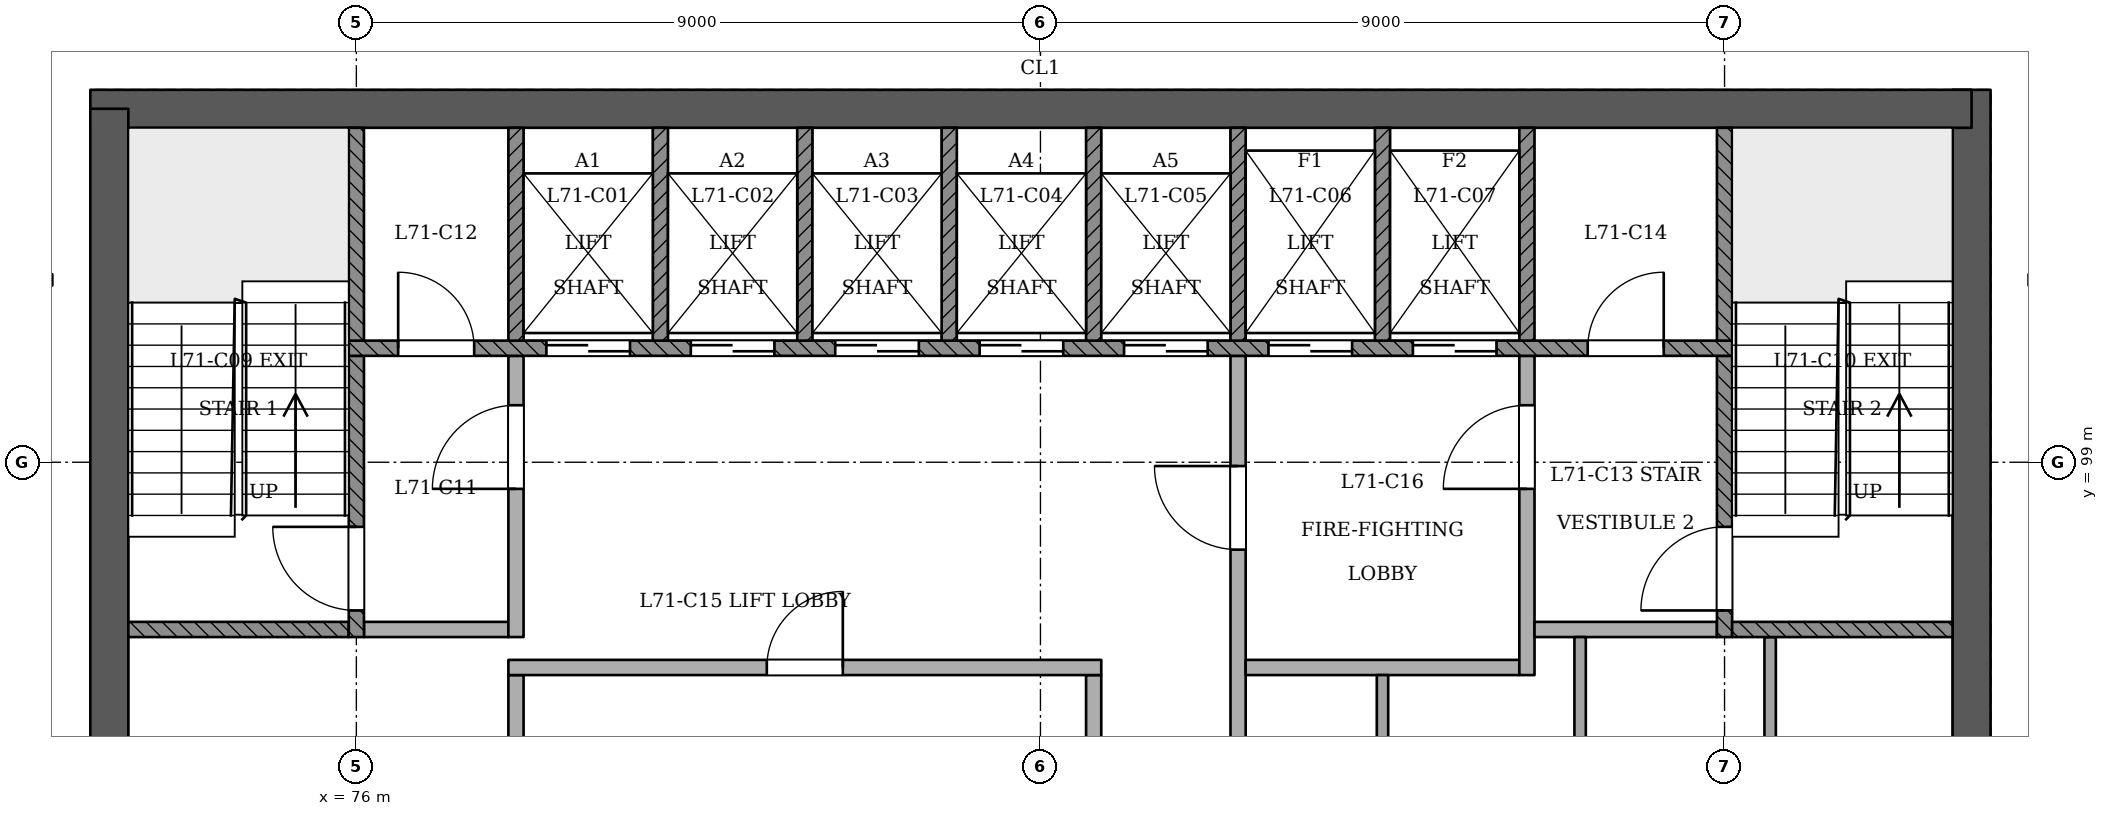
"""IFC4 building model, lengths in metres.
Left out: names, types, materials, properties, quantities, classifications, styles, units other than length and angle.
Written with IfcOpenShell. Run it as: python <this file> out.ifc"""

import sys

from ifc_helpers import new_model, si_unit, direction, frame, frame_2d, origin, place, context, subcontext, project, spatial, rectangle, extrude, element, fill, save


model = new_model("IFC4")
c1 = context("Model", 3, precision=1e-05, world=origin(), true_north=direction((0.0, 1.0)))
c2 = subcontext(c1, "Body", "Model", "MODEL_VIEW")
j1 = project(units=[si_unit("LENGTHUNIT", "METRE"), si_unit("PLANEANGLEUNIT", "RADIAN")], contexts=[c1])
p1 = place(None, origin())
s1 = spatial("IfcSite", under=j1, at=p1, CompositionType="ELEMENT")
p2 = place(p1, origin())
s2 = spatial("IfcBuilding", under=s1, at=p2, CompositionType="ELEMENT")
p3 = place(p2, frame((0.0, 0.0, 275.2)))
s3 = spatial("IfcBuildingStorey", under=s2, at=p3, CompositionType="ELEMENT", Elevation=275.2)
p4 = place(p3, frame((97.25, 93.15, 0.0), z_axis=(0.0, 0.0, 1.0), x_axis=(0.0, 1.0, 0.0)))
e1 = element("IfcWall", 1, at=p4, inside=s3, PredefinedType="SHEAR", context=c2, shape_type="SweptSolid", body=[
    extrude(rectangle(XDim=10.75, YDim=0.5, at=frame_2d((5.375, 0.0))), origin(), (0.0, 0.0, 1.0), 3.6),
])
p5 = place(p3, frame((97.25, 103.65, 0.0), z_axis=(0.0, 0.0, 1.0), x_axis=(-1.0, 0.0, 0.0)))
e2 = element("IfcWall", 2, at=p5, inside=s3, PredefinedType="SHEAR", context=c2, shape_type="SweptSolid", body=[
    extrude(rectangle(XDim=24.75, YDim=0.5, at=frame_2d((12.375, 0.0))), origin(), (0.0, 0.0, 1.0), 3.6),
])
p6 = place(p3, frame((72.75, 103.65, 0.0), z_axis=(0.0, 0.0, 1.0), x_axis=(0.0, -1.0, 0.0)))
e3 = element("IfcWall", 3, at=p6, inside=s3, PredefinedType="SHEAR", context=c2, shape_type="SweptSolid", body=[
    extrude(rectangle(XDim=10.75, YDim=0.5, at=frame_2d((5.375, 0.0))), origin(), (0.0, 0.0, 1.0), 3.6),
])
p7 = place(p3, frame((72.0, 101.4, 0.0), z_axis=(0.0, 0.0, 1.0), x_axis=(-1.0, 0.0, 0.0)))
e4 = element("IfcWall", 4, at=p7, inside=s3, PredefinedType="PARTITIONING", context=c2, shape_type="SweptSolid", body=[
    extrude(rectangle(XDim=1.8, YDim=0.15, at=frame_2d((0.9, 0.0))), origin(), (0.0, 0.0, 1.0), 3.2),
])
for number, where, z_axis, x_axis in (
    (5, (78.1, 93.4, 0.0), (0.0, 0.0, 1.0), (0.0, 1.0, 0.0)),
    (6, (85.7, 93.4, 0.0), (0.0, 0.0, 1.0), (0.0, 1.0, 0.0)),
):
    element("IfcWall", number, at=place(p3, frame(where, z_axis=z_axis, x_axis=x_axis)), inside=s3, PredefinedType="PARTITIONING", context=c2, shape_type="SweptSolid", body=[
        extrude(rectangle(XDim=2.8, YDim=0.2, at=frame_2d((1.4, 0.0))), origin(), (0.0, 0.0, 1.0), 3.2),
    ])
p8 = place(p3, frame((87.6, 93.4, 0.0), z_axis=(0.0, 0.0, 1.0), x_axis=(0.0, 1.0, 0.0)))
e7 = element("IfcWall", 7, at=p8, inside=s3, PredefinedType="PARTITIONING", context=c2, shape_type="SweptSolid", body=[
    extrude(rectangle(XDim=7.0, YDim=0.2, at=frame_2d((3.5, 0.0))), origin(), (0.0, 0.0, 1.0), 3.2),
])
p9 = place(p8, frame((4.45, 0.0, 0.0)))
e8 = element("IfcOpeningElement", 8, at=p9, cuts=e7, PredefinedType="OPENING", context=c2, shape_type="SweptSolid", body=[
    extrude(rectangle(XDim=1.1, YDim=2.1, at=frame_2d((0.55, 1.05))), frame((0.0, 0.11, 0.0), z_axis=(0.0, -1.0, 0.0), x_axis=(1.0, 0.0, 0.0)), (0.0, 0.0, 1.0), 0.221),
])
p10 = place(p3, frame((89.5, 93.4, 0.0), z_axis=(0.0, 0.0, 1.0), x_axis=(0.0, 1.0, 0.0)))
e9 = element("IfcWall", 9, at=p10, inside=s3, PredefinedType="PARTITIONING", context=c2, shape_type="SweptSolid", body=[
    extrude(rectangle(XDim=2.8, YDim=0.15, at=frame_2d((1.4, 0.0))), origin(), (0.0, 0.0, 1.0), 3.2),
])
for number, where, z_axis, x_axis in (
    (10, (92.1, 93.4, 0.0), (0.0, 0.0, 1.0), (0.0, 1.0, 0.0)),
    (11, (94.6, 93.4, 0.0), (0.0, 0.0, 1.0), (0.0, 1.0, 0.0)),
):
    element("IfcWall", number, at=place(p3, frame(where, z_axis=z_axis, x_axis=x_axis)), inside=s3, PredefinedType="PARTITIONING", context=c2, shape_type="SweptSolid", body=[
        extrude(rectangle(XDim=3.3, YDim=0.15, at=frame_2d((1.65, 0.0))), origin(), (0.0, 0.0, 1.0), 3.2),
    ])
p11 = place(p3, frame((78.0, 96.3, 0.0), z_axis=(0.0, 0.0, 1.0), x_axis=(1.0, 0.0, 0.0)))
e12 = element("IfcWall", 12, at=p11, inside=s3, PredefinedType="PARTITIONING", context=c2, shape_type="SweptSolid", body=[
    extrude(rectangle(XDim=7.8, YDim=0.2, at=frame_2d((3.9, 0.0))), origin(), (0.0, 0.0, 1.0), 3.2),
])
p12 = place(p11, frame((3.4, 0.0, 0.0)))
e13 = element("IfcOpeningElement", 13, at=p12, cuts=e12, PredefinedType="OPENING", context=c2, shape_type="SweptSolid", body=[
    extrude(rectangle(XDim=1.0, YDim=2.1, at=frame_2d((0.5, 1.05))), frame((0.0, 0.11, 0.0), z_axis=(0.0, -1.0, 0.0), x_axis=(1.0, 0.0, 0.0)), (0.0, 0.0, 1.0), 0.221),
])
p13 = place(p3, frame((87.7, 96.3, 0.0), z_axis=(0.0, 0.0, 1.0), x_axis=(1.0, 0.0, 0.0)))
e14 = element("IfcWall", 14, at=p13, inside=s3, PredefinedType="PARTITIONING", context=c2, shape_type="SweptSolid", body=[
    extrude(rectangle(XDim=3.6, YDim=0.2, at=frame_2d((1.8, 0.0))), origin(), (0.0, 0.0, 1.0), 3.2),
])
p14 = place(p3, frame((91.4, 96.2, 0.0), z_axis=(0.0, 0.0, 1.0), x_axis=(0.0, 1.0, 0.0)))
e15 = element("IfcWall", 15, at=p14, inside=s3, PredefinedType="PARTITIONING", context=c2, shape_type="SweptSolid", body=[
    extrude(rectangle(XDim=4.2, YDim=0.2, at=frame_2d((2.1, 0.0))), origin(), (0.0, 0.0, 1.0), 3.2),
])
p15 = place(p14, frame((2.45, 0.0, 0.0)))
e16 = element("IfcOpeningElement", 16, at=p15, cuts=e15, PredefinedType="OPENING", context=c2, shape_type="SweptSolid", body=[
    extrude(rectangle(XDim=1.1, YDim=2.1, at=frame_2d((0.55, 1.05))), frame((0.0, 0.11, 0.0), z_axis=(0.0, -1.0, 0.0), x_axis=(1.0, 0.0, 0.0)), (0.0, 0.0, 1.0), 0.221),
])
p16 = place(p3, frame((73.0, 96.8, 0.0), z_axis=(0.0, 0.0, 1.0), x_axis=(1.0, 0.0, 0.0)))
e17 = element("IfcWall", 17, at=p16, inside=s3, PredefinedType="SOLIDWALL", context=c2, shape_type="SweptSolid", body=[
    extrude(rectangle(XDim=2.9, YDim=0.2, at=frame_2d((1.45, 0.0))), origin(), (0.0, 0.0, 1.0), 3.2),
])
p17 = place(p3, frame((76.0, 96.7, 0.0), z_axis=(0.0, 0.0, 1.0), x_axis=(0.0, 1.0, 0.0)))
e18 = element("IfcWall", 18, at=p17, inside=s3, PredefinedType="SOLIDWALL", context=c2, shape_type="SweptSolid", body=[
    extrude(rectangle(XDim=3.7, YDim=0.2, at=frame_2d((1.85, 0.0))), origin(), (0.0, 0.0, 1.0), 3.2),
])
p18 = place(p17, frame((0.35, 0.0, 0.0)))
e19 = element("IfcOpeningElement", 19, at=p18, cuts=e18, PredefinedType="OPENING", context=c2, shape_type="SweptSolid", body=[
    extrude(rectangle(XDim=1.1, YDim=2.1, at=frame_2d((0.55, 1.05))), frame((0.0, 0.11, 0.0), z_axis=(0.0, -1.0, 0.0), x_axis=(1.0, 0.0, 0.0)), (0.0, 0.0, 1.0), 0.221),
])
p19 = place(p3, frame((76.1, 96.8, 0.0), z_axis=(0.0, 0.0, 1.0), x_axis=(1.0, 0.0, 0.0)))
e20 = element("IfcWall", 20, at=p19, inside=s3, PredefinedType="PARTITIONING", context=c2, shape_type="SweptSolid", body=[
    extrude(rectangle(XDim=1.9, YDim=0.2, at=frame_2d((0.95, 0.0))), origin(), (0.0, 0.0, 1.0), 3.2),
])
p20 = place(p3, frame((78.1, 96.7, 0.0), z_axis=(0.0, 0.0, 1.0), x_axis=(0.0, 1.0, 0.0)))
e21 = element("IfcWall", 21, at=p20, inside=s3, PredefinedType="PARTITIONING", context=c2, shape_type="SweptSolid", body=[
    extrude(rectangle(XDim=3.7, YDim=0.2, at=frame_2d((1.85, 0.0))), origin(), (0.0, 0.0, 1.0), 3.2),
])
p21 = place(p20, frame((1.95, 0.0, 0.0)))
e22 = element("IfcOpeningElement", 22, at=p21, cuts=e21, PredefinedType="OPENING", context=c2, shape_type="SweptSolid", body=[
    extrude(rectangle(XDim=1.1, YDim=2.1, at=frame_2d((0.55, 1.05))), frame((0.0, 0.11, 0.0), z_axis=(0.0, -1.0, 0.0), x_axis=(1.0, 0.0, 0.0)), (0.0, 0.0, 1.0), 0.221),
])
p22 = place(p3, frame((91.5, 96.8, 0.0), z_axis=(0.0, 0.0, 1.0), x_axis=(1.0, 0.0, 0.0)))
e23 = element("IfcWall", 23, at=p22, inside=s3, PredefinedType="PARTITIONING", context=c2, shape_type="SweptSolid", body=[
    extrude(rectangle(XDim=2.4, YDim=0.2, at=frame_2d((1.2, 0.0))), origin(), (0.0, 0.0, 1.0), 3.2),
])
p23 = place(p3, frame((94.0, 96.7, 0.0), z_axis=(0.0, 0.0, 1.0), x_axis=(0.0, 1.0, 0.0)))
e24 = element("IfcWall", 24, at=p23, inside=s3, PredefinedType="SOLIDWALL", context=c2, shape_type="SweptSolid", body=[
    extrude(rectangle(XDim=3.7, YDim=0.2, at=frame_2d((1.85, 0.0))), origin(), (0.0, 0.0, 1.0), 3.2),
])
p24 = place(p23, frame((0.35, 0.0, 0.0)))
e25 = element("IfcOpeningElement", 25, at=p24, cuts=e24, PredefinedType="OPENING", context=c2, shape_type="SweptSolid", body=[
    extrude(rectangle(XDim=1.1, YDim=2.1, at=frame_2d((0.55, 1.05))), frame((0.0, 0.11, 0.0), z_axis=(0.0, -1.0, 0.0), x_axis=(1.0, 0.0, 0.0)), (0.0, 0.0, 1.0), 0.221),
])
p25 = place(p3, frame((94.1, 96.8, 0.0), z_axis=(0.0, 0.0, 1.0), x_axis=(1.0, 0.0, 0.0)))
e26 = element("IfcWall", 26, at=p25, inside=s3, PredefinedType="SOLIDWALL", context=c2, shape_type="SweptSolid", body=[
    extrude(rectangle(XDim=2.9, YDim=0.2, at=frame_2d((1.45, 0.0))), origin(), (0.0, 0.0, 1.0), 3.2),
])
p26 = place(p3, frame((75.9, 100.5, 0.0), z_axis=(0.0, 0.0, 1.0), x_axis=(1.0, 0.0, 0.0)))
e27 = element("IfcWall", 27, at=p26, inside=s3, PredefinedType="SOLIDWALL", context=c2, shape_type="SweptSolid", body=[
    extrude(rectangle(XDim=18.2, YDim=0.2, at=frame_2d((9.1, 0.0))), origin(), (0.0, 0.0, 1.0), 3.2),
])
p27 = place(p26, frame((2.6, 0.0, 0.0)))
e28 = element("IfcOpeningElement", 28, at=p27, cuts=e27, PredefinedType="OPENING", context=c2, shape_type="SweptSolid", body=[
    extrude(rectangle(XDim=1.1, YDim=2.1, at=frame_2d((0.55, 1.05))), frame((0.0, 0.11, 0.0), z_axis=(0.0, -1.0, 0.0), x_axis=(1.0, 0.0, 0.0)), (0.0, 0.0, 1.0), 0.221),
])
p28 = place(p26, frame((4.5, 0.0, 0.0)))
e29 = element("IfcOpeningElement", 29, at=p28, cuts=e27, PredefinedType="OPENING", context=c2, shape_type="SweptSolid", body=[
    extrude(rectangle(XDim=1.1, YDim=2.1, at=frame_2d((0.55, 1.05))), frame((0.0, 0.11, 0.0), z_axis=(0.0, -1.0, 0.0), x_axis=(1.0, 0.0, 0.0)), (0.0, 0.0, 1.0), 0.221),
])
p29 = place(p26, frame((6.4, 0.0, 0.0)))
e30 = element("IfcOpeningElement", 30, at=p29, cuts=e27, PredefinedType="OPENING", context=c2, shape_type="SweptSolid", body=[
    extrude(rectangle(XDim=1.1, YDim=2.1, at=frame_2d((0.55, 1.05))), frame((0.0, 0.11, 0.0), z_axis=(0.0, -1.0, 0.0), x_axis=(1.0, 0.0, 0.0)), (0.0, 0.0, 1.0), 0.221),
])
p30 = place(p26, frame((8.3, 0.0, 0.0)))
e31 = element("IfcOpeningElement", 31, at=p30, cuts=e27, PredefinedType="OPENING", context=c2, shape_type="SweptSolid", body=[
    extrude(rectangle(XDim=1.1, YDim=2.1, at=frame_2d((0.55, 1.05))), frame((0.0, 0.11, 0.0), z_axis=(0.0, -1.0, 0.0), x_axis=(1.0, 0.0, 0.0)), (0.0, 0.0, 1.0), 0.221),
])
p31 = place(p26, frame((10.2, 0.0, 0.0)))
e32 = element("IfcOpeningElement", 32, at=p31, cuts=e27, PredefinedType="OPENING", context=c2, shape_type="SweptSolid", body=[
    extrude(rectangle(XDim=1.1, YDim=2.1, at=frame_2d((0.55, 1.05))), frame((0.0, 0.11, 0.0), z_axis=(0.0, -1.0, 0.0), x_axis=(1.0, 0.0, 0.0)), (0.0, 0.0, 1.0), 0.221),
])
p32 = place(p26, frame((12.1, 0.0, 0.0)))
e33 = element("IfcOpeningElement", 33, at=p32, cuts=e27, PredefinedType="OPENING", context=c2, shape_type="SweptSolid", body=[
    extrude(rectangle(XDim=1.1, YDim=2.1, at=frame_2d((0.55, 1.05))), frame((0.0, 0.11, 0.0), z_axis=(0.0, -1.0, 0.0), x_axis=(1.0, 0.0, 0.0)), (0.0, 0.0, 1.0), 0.221),
])
p33 = place(p26, frame((14.0, 0.0, 0.0)))
e34 = element("IfcOpeningElement", 34, at=p33, cuts=e27, PredefinedType="OPENING", context=c2, shape_type="SweptSolid", body=[
    extrude(rectangle(XDim=1.1, YDim=2.1, at=frame_2d((0.55, 1.05))), frame((0.0, 0.11, 0.0), z_axis=(0.0, -1.0, 0.0), x_axis=(1.0, 0.0, 0.0)), (0.0, 0.0, 1.0), 0.221),
])
p34 = place(p26, frame((0.65, 0.0, 0.0)))
e35 = element("IfcOpeningElement", 35, at=p34, cuts=e27, PredefinedType="OPENING", context=c2, shape_type="SweptSolid", body=[
    extrude(rectangle(XDim=1.0, YDim=2.1, at=frame_2d((0.5, 1.05))), frame((0.0, 0.11, 0.0), z_axis=(0.0, -1.0, 0.0), x_axis=(1.0, 0.0, 0.0)), (0.0, 0.0, 1.0), 0.221),
])
p35 = place(p26, frame((16.3, 0.0, 0.0)))
e36 = element("IfcOpeningElement", 36, at=p35, cuts=e27, PredefinedType="OPENING", context=c2, shape_type="SweptSolid", body=[
    extrude(rectangle(XDim=1.0, YDim=2.1, at=frame_2d((0.5, 1.05))), frame((0.0, 0.11, 0.0), z_axis=(0.0, -1.0, 0.0), x_axis=(1.0, 0.0, 0.0)), (0.0, 0.0, 1.0), 0.221),
])
for number, where, z_axis, x_axis in (
    (37, (76.0, 100.6, 0.0), (0.0, 0.0, 1.0), (0.0, 1.0, 0.0)),
    (38, (78.1, 100.6, 0.0), (0.0, 0.0, 1.0), (0.0, 1.0, 0.0)),
    (39, (80.0, 100.6, 0.0), (0.0, 0.0, 1.0), (0.0, 1.0, 0.0)),
    (40, (81.9, 100.6, 0.0), (0.0, 0.0, 1.0), (0.0, 1.0, 0.0)),
    (41, (83.8, 100.6, 0.0), (0.0, 0.0, 1.0), (0.0, 1.0, 0.0)),
    (42, (85.7, 100.6, 0.0), (0.0, 0.0, 1.0), (0.0, 1.0, 0.0)),
    (43, (87.6, 100.6, 0.0), (0.0, 0.0, 1.0), (0.0, 1.0, 0.0)),
    (44, (89.5, 100.6, 0.0), (0.0, 0.0, 1.0), (0.0, 1.0, 0.0)),
    (45, (91.4, 100.6, 0.0), (0.0, 0.0, 1.0), (0.0, 1.0, 0.0)),
    (46, (94.0, 100.6, 0.0), (0.0, 0.0, 1.0), (0.0, 1.0, 0.0)),
):
    element("IfcWall", number, at=place(p3, frame(where, z_axis=z_axis, x_axis=x_axis)), inside=s3, PredefinedType="SOLIDWALL", context=c2, shape_type="SweptSolid", body=[
        extrude(rectangle(XDim=2.8, YDim=0.2, at=frame_2d((1.4, 0.0))), origin(), (0.0, 0.0, 1.0), 3.2),
    ])
p36 = place(p27, origin())
e47 = element("IfcDoor", 47, at=p36, inside=s3, OperationType="SLIDING_TO_RIGHT", PredefinedType="NOTDEFINED", context=c2, shape_type="SweptSolid", body=[
    extrude(rectangle(XDim=1.1, YDim=2.1, at=frame_2d((0.55, 1.05))), frame((0.0, 0.025, 0.0), z_axis=(0.0, -1.0, 0.0), x_axis=(1.0, 0.0, 0.0)), (0.0, 0.0, 1.0), 0.05),
])
fill(e28, e47)
p37 = place(p28, origin())
e48 = element("IfcDoor", 48, at=p37, inside=s3, OperationType="SLIDING_TO_LEFT", PredefinedType="NOTDEFINED", context=c2, shape_type="SweptSolid", body=[
    extrude(rectangle(XDim=1.1, YDim=2.1, at=frame_2d((0.55, 1.05))), frame((0.0, 0.025, 0.0), z_axis=(0.0, -1.0, 0.0), x_axis=(1.0, 0.0, 0.0)), (0.0, 0.0, 1.0), 0.05),
])
fill(e29, e48)
p38 = place(p29, origin())
e49 = element("IfcDoor", 49, at=p38, inside=s3, OperationType="SLIDING_TO_RIGHT", PredefinedType="NOTDEFINED", context=c2, shape_type="SweptSolid", body=[
    extrude(rectangle(XDim=1.1, YDim=2.1, at=frame_2d((0.55, 1.05))), frame((0.0, 0.025, 0.0), z_axis=(0.0, -1.0, 0.0), x_axis=(1.0, 0.0, 0.0)), (0.0, 0.0, 1.0), 0.05),
])
fill(e30, e49)
p39 = place(p30, origin())
e50 = element("IfcDoor", 50, at=p39, inside=s3, OperationType="SLIDING_TO_LEFT", PredefinedType="NOTDEFINED", context=c2, shape_type="SweptSolid", body=[
    extrude(rectangle(XDim=1.1, YDim=2.1, at=frame_2d((0.55, 1.05))), frame((0.0, 0.025, 0.0), z_axis=(0.0, -1.0, 0.0), x_axis=(1.0, 0.0, 0.0)), (0.0, 0.0, 1.0), 0.05),
])
fill(e31, e50)
p40 = place(p31, origin())
e51 = element("IfcDoor", 51, at=p40, inside=s3, OperationType="SLIDING_TO_RIGHT", PredefinedType="NOTDEFINED", context=c2, shape_type="SweptSolid", body=[
    extrude(rectangle(XDim=1.1, YDim=2.1, at=frame_2d((0.55, 1.05))), frame((0.0, 0.025, 0.0), z_axis=(0.0, -1.0, 0.0), x_axis=(1.0, 0.0, 0.0)), (0.0, 0.0, 1.0), 0.05),
])
fill(e32, e51)
p41 = place(p32, origin())
e52 = element("IfcDoor", 52, at=p41, inside=s3, OperationType="SLIDING_TO_RIGHT", PredefinedType="NOTDEFINED", context=c2, shape_type="SweptSolid", body=[
    extrude(rectangle(XDim=1.1, YDim=2.1, at=frame_2d((0.55, 1.05))), frame((0.0, 0.025, 0.0), z_axis=(0.0, -1.0, 0.0), x_axis=(1.0, 0.0, 0.0)), (0.0, 0.0, 1.0), 0.05),
])
fill(e33, e52)
p42 = place(p33, origin())
e53 = element("IfcDoor", 53, at=p42, inside=s3, OperationType="SLIDING_TO_LEFT", PredefinedType="NOTDEFINED", context=c2, shape_type="SweptSolid", body=[
    extrude(rectangle(XDim=1.1, YDim=2.1, at=frame_2d((0.55, 1.05))), frame((0.0, 0.025, 0.0), z_axis=(0.0, -1.0, 0.0), x_axis=(1.0, 0.0, 0.0)), (0.0, 0.0, 1.0), 0.05),
])
fill(e34, e53)
p43 = place(p18, origin())
e54 = element("IfcDoor", 54, at=p43, inside=s3, OperationType="SINGLE_SWING_RIGHT", PredefinedType="NOTDEFINED", context=c2, shape_type="SweptSolid", body=[
    extrude(rectangle(XDim=1.1, YDim=2.1, at=frame_2d((0.55, 1.05))), frame((0.0, 0.025, 0.0), z_axis=(0.0, -1.0, 0.0), x_axis=(1.0, 0.0, 0.0)), (0.0, 0.0, 1.0), 0.05),
])
fill(e19, e54)
p44 = place(p24, origin())
e55 = element("IfcDoor", 55, at=p44, inside=s3, OperationType="SINGLE_SWING_LEFT", PredefinedType="NOTDEFINED", context=c2, shape_type="SweptSolid", body=[
    extrude(rectangle(XDim=1.1, YDim=2.1, at=frame_2d((0.55, 1.05))), frame((0.0, 0.025, 0.0), z_axis=(0.0, -1.0, 0.0), x_axis=(1.0, 0.0, 0.0)), (0.0, 0.0, 1.0), 0.05),
])
fill(e25, e55)
p45 = place(p21, origin())
e56 = element("IfcDoor", 56, at=p45, inside=s3, OperationType="SINGLE_SWING_LEFT", PredefinedType="NOTDEFINED", context=c2, shape_type="SweptSolid", body=[
    extrude(rectangle(XDim=1.1, YDim=2.1, at=frame_2d((0.55, 1.05))), frame((0.0, 0.025, 0.0), z_axis=(0.0, -1.0, 0.0), x_axis=(1.0, 0.0, 0.0)), (0.0, 0.0, 1.0), 0.05),
])
fill(e22, e56)
p46 = place(p9, origin())
e57 = element("IfcDoor", 57, at=p46, inside=s3, OperationType="SINGLE_SWING_RIGHT", PredefinedType="NOTDEFINED", context=c2, shape_type="SweptSolid", body=[
    extrude(rectangle(XDim=1.1, YDim=2.1, at=frame_2d((0.55, 1.05))), frame((0.0, 0.025, 0.0), z_axis=(0.0, -1.0, 0.0), x_axis=(1.0, 0.0, 0.0)), (0.0, 0.0, 1.0), 0.05),
])
fill(e8, e57)
p47 = place(p15, origin())
e58 = element("IfcDoor", 58, at=p47, inside=s3, OperationType="SINGLE_SWING_LEFT", PredefinedType="NOTDEFINED", context=c2, shape_type="SweptSolid", body=[
    extrude(rectangle(XDim=1.1, YDim=2.1, at=frame_2d((0.55, 1.05))), frame((0.0, 0.025, 0.0), z_axis=(0.0, -1.0, 0.0), x_axis=(1.0, 0.0, 0.0)), (0.0, 0.0, 1.0), 0.05),
])
fill(e16, e58)
p48 = place(p34, origin())
e59 = element("IfcDoor", 59, at=p48, inside=s3, OperationType="SINGLE_SWING_LEFT", PredefinedType="NOTDEFINED", context=c2, shape_type="SweptSolid", body=[
    extrude(rectangle(XDim=1.0, YDim=2.1, at=frame_2d((0.5, 1.05))), frame((0.0, 0.025, 0.0), z_axis=(0.0, -1.0, 0.0), x_axis=(1.0, 0.0, 0.0)), (0.0, 0.0, 1.0), 0.05),
])
fill(e35, e59)
p49 = place(p35, origin())
e60 = element("IfcDoor", 60, at=p49, inside=s3, OperationType="SINGLE_SWING_RIGHT", PredefinedType="NOTDEFINED", context=c2, shape_type="SweptSolid", body=[
    extrude(rectangle(XDim=1.0, YDim=2.1, at=frame_2d((0.5, 1.05))), frame((0.0, 0.025, 0.0), z_axis=(0.0, -1.0, 0.0), x_axis=(1.0, 0.0, 0.0)), (0.0, 0.0, 1.0), 0.05),
])
fill(e36, e60)
p50 = place(p12, origin())
e61 = element("IfcDoor", 61, at=p50, inside=s3, OperationType="SINGLE_SWING_RIGHT", PredefinedType="NOTDEFINED", context=c2, shape_type="SweptSolid", body=[
    extrude(rectangle(XDim=1.0, YDim=2.1, at=frame_2d((0.5, 1.05))), frame((0.0, 0.025, 0.0), z_axis=(0.0, -1.0, 0.0), x_axis=(1.0, 0.0, 0.0)), (0.0, 0.0, 1.0), 0.05),
])
fill(e13, e61)
save(model, sys.argv[1])
